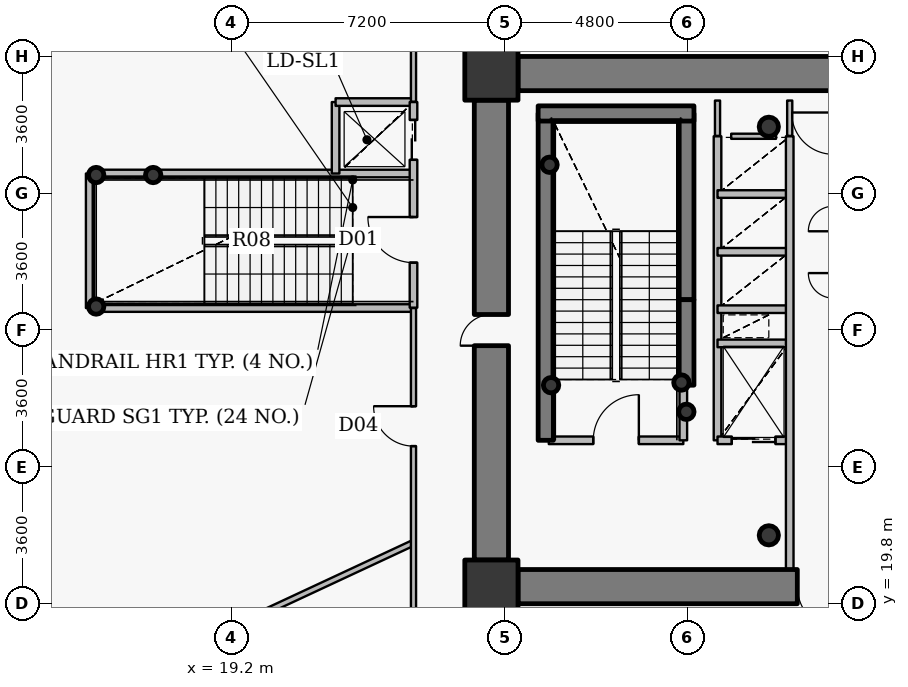
"""IFC4 building model, lengths in metres.
Left out: names, types, materials, properties, quantities, classifications, styles, units other than length and angle.
Written with IfcOpenShell. Run it as: python <this file> out.ifc"""

import sys

from ifc_helpers import new_model, si_unit, direction, frame, frame_2d, origin, origin_2d, place, context, subcontext, project, spatial, rectangle, hollow_circle, extrude, source, transform, mapped, element, fill, save


model = new_model("IFC4")
c1 = context("Model", 3, precision=1e-05, world=origin(), true_north=direction((0.0, 1.0)))
c2 = subcontext(c1, "Body", "Model", "MODEL_VIEW")
j1 = project(units=[si_unit("LENGTHUNIT", "METRE"), si_unit("PLANEANGLEUNIT", "RADIAN")], contexts=[c1])
p1 = place(None, origin())
s1 = spatial("IfcSite", under=j1, at=p1, CompositionType="ELEMENT")
p2 = place(p1, origin())
s2 = spatial("IfcBuilding", under=s1, at=p2, CompositionType="ELEMENT")
p3 = place(p2, frame((0.0, 0.0, 22.8)))
s3 = spatial("IfcBuildingStorey", under=s2, at=p3, CompositionType="ELEMENT", Elevation=22.8)
for number, where, z_axis, x_axis in (
    (1, (26.05, 20.25, 0.0), (0.0, 0.0, 1.0), (1.0, 0.0, 0.0)),
    (2, (26.05, 33.75, 0.0), (0.0, 0.0, 1.0), (1.0, 0.0, 0.0)),
):
    element("IfcColumn", number, at=place(p3, frame(where, z_axis=z_axis, x_axis=x_axis)), inside=s3, PredefinedType="COLUMN", context=c2, shape_type="SweptSolid", body=[
        extrude(rectangle(XDim=1.4, YDim=1.4, at=origin_2d()), origin(), (0.0, 0.0, 1.0), 4.2),
    ])
for number, where, z_axis, x_axis in (
    (3, (33.35, 21.6, 0.0), (0.0, 0.0, 1.0), (1.0, 0.0, 0.0)),
    (4, (33.35, 32.35, 0.0), (0.0, 0.0, 1.0), (1.0, 0.0, 0.0)),
):
    element("IfcColumn", number, at=place(p3, frame(where, z_axis=z_axis, x_axis=x_axis)), inside=s3, PredefinedType="COLUMN", context=c2, shape_type="SweptSolid", body=[
        extrude(hollow_circle(Radius=0.254, WallThickness=0.02, at=origin_2d()), origin(), (0.0, 0.0, 1.0), 4.2),
    ])
p4 = place(p3, frame((27.48, 24.1, 0.0), z_axis=(0.0, 0.0, 1.0), x_axis=(0.0, 1.0, 0.0)))
e5 = element("IfcWall", 5, at=p4, inside=s3, PredefinedType="SHEAR", context=c2, shape_type="SweptSolid", body=[
    extrude(rectangle(XDim=8.6, YDim=0.4, at=frame_2d((4.3, 0.0))), origin(), (0.0, 0.0, 1.0), 4.2),
])
p5 = place(p3, frame((31.18, 27.8, 0.0), z_axis=(0.0, 0.0, 1.0), x_axis=(0.0, 1.0, 0.0)))
e6 = element("IfcWall", 6, at=p5, inside=s3, PredefinedType="SHEAR", context=c2, shape_type="SweptSolid", body=[
    extrude(rectangle(XDim=4.9, YDim=0.4, at=frame_2d((2.45, 0.0))), origin(), (0.0, 0.0, 1.0), 4.2),
])
p6 = place(p3, frame((27.28, 32.7, 0.0), z_axis=(0.0, 0.0, 1.0), x_axis=(1.0, 0.0, 0.0)))
e7 = element("IfcWall", 7, at=p6, inside=s3, PredefinedType="SHEAR", context=c2, shape_type="SweptSolid", body=[
    extrude(rectangle(XDim=4.1, YDim=0.4, at=frame_2d((2.05, 0.0))), origin(), (0.0, 0.0, 1.0), 4.2),
])
for number, where, z_axis, x_axis in (
    (8, (27.58, 31.35, 0.0), (0.0, 0.0, 1.0), (1.0, 0.0, 0.0)),
    (9, (31.05, 25.62, 0.0), (0.0, 0.0, 1.0), (1.0, 0.0, 0.0)),
    (10, (31.18, 24.85, 0.0), (0.0, 0.0, 1.0), (1.0, 0.0, 0.0)),
    (11, (27.62, 25.55, 0.0), (0.0, 0.0, 1.0), (1.0, 0.0, 0.0)),
    (12, (15.65, 27.62, 0.0), (0.0, 0.0, 1.0), (1.0, 0.0, 0.0)),
    (13, (15.65, 31.08, 0.0), (0.0, 0.0, 1.0), (1.0, 0.0, 0.0)),
    (14, (17.15, 31.08, 0.0), (0.0, 0.0, 1.0), (1.0, 0.0, 0.0)),
):
    element("IfcColumn", number, at=place(p3, frame(where, z_axis=z_axis, x_axis=x_axis)), inside=s3, PredefinedType="COLUMN", context=c2, shape_type="SweptSolid", body=[
        extrude(hollow_circle(Radius=0.203, WallThickness=0.016, at=origin_2d()), origin(), (0.0, 0.0, 1.0), 4.2),
    ])
p7 = place(p3, frame((26.75, 33.75, 0.0), z_axis=(0.0, 0.0, 1.0), x_axis=(1.0, 0.0, 0.0)))
e15 = element("IfcWall", 15, at=p7, inside=s3, PredefinedType="SHEAR", context=c2, shape_type="SweptSolid", body=[
    extrude(rectangle(XDim=18.5, YDim=0.9, at=frame_2d((9.25, 0.0))), origin(), (0.0, 0.0, 1.0), 3.35),
])
p8 = place(p3, frame((45.25, 20.25, 0.0), z_axis=(0.0, 0.0, 1.0), x_axis=(-1.0, 0.0, 0.0)))
e16 = element("IfcWall", 16, at=p8, inside=s3, PredefinedType="SHEAR", context=c2, shape_type="SweptSolid", body=[
    extrude(rectangle(XDim=18.5, YDim=0.9, at=frame_2d((9.25, 0.0))), origin(), (0.0, 0.0, 1.0), 3.35),
])
p9 = place(p8, frame((10.0, 0.0, 0.0)))
e17 = element("IfcOpeningElement", 17, at=p9, cuts=e16, PredefinedType="OPENING", context=c2, shape_type="SweptSolid", body=[
    extrude(rectangle(XDim=1.15, YDim=2.15, at=origin_2d()), frame((0.575, 0.46, 1.075), z_axis=(0.0, -1.0, 0.0), x_axis=(1.0, 0.0, 0.0)), (0.0, 0.0, 1.0), 0.92),
])
p10 = place(p3, frame((26.05, 20.95, 0.0), z_axis=(0.0, 0.0, 1.0), x_axis=(0.0, 1.0, 0.0)))
e18 = element("IfcWall", 18, at=p10, inside=s3, PredefinedType="SHEAR", context=c2, shape_type="SweptSolid", body=[
    extrude(rectangle(XDim=12.1, YDim=0.9, at=frame_2d((6.05, 0.0))), origin(), (0.0, 0.0, 1.0), 3.35),
])
p11 = place(p10, frame((5.64, 0.0, 0.0)))
e19 = element("IfcOpeningElement", 19, at=p11, cuts=e18, PredefinedType="OPENING", context=c2, shape_type="SweptSolid", body=[
    extrude(rectangle(XDim=0.82, YDim=2.1, at=origin_2d()), frame((0.41, 0.46, 1.05), z_axis=(0.0, -1.0, 0.0), x_axis=(1.0, 0.0, 0.0)), (0.0, 0.0, 1.0), 0.92),
])
p12 = place(p3, frame((31.18, 25.55, 0.0), z_axis=(0.0, 0.0, 1.0), x_axis=(0.0, 1.0, 0.0)))
e20 = element("IfcWall", 20, at=p12, inside=s3, PredefinedType="SHEAR", context=c2, shape_type="SweptSolid", body=[
    extrude(rectangle(XDim=2.25, YDim=0.4, at=frame_2d((1.125, 0.0))), origin(), (0.0, 0.0, 1.0), 3.5),
])
p13 = place(p3, frame((7.671, 13.79, 0.0), z_axis=(0.0, 0.0, 1.0), x_axis=(0.906305303078, 0.422623588567, 0.0)))
e21 = element("IfcWall", 21, at=p13, inside=s3, PredefinedType="PARTITIONING", context=c2, shape_type="SweptSolid", body=[
    extrude(rectangle(XDim=18.017, YDim=0.15, at=frame_2d((9.009, 0.0))), origin(), (0.0, 0.0, 1.0), 3.085),
])
p14 = place(p3, frame((15.48, 27.58, 0.0), z_axis=(0.0, 0.0, 1.0), x_axis=(0.0, 1.0, 0.0)))
e22 = element("IfcWall", 22, at=p14, inside=s3, PredefinedType="PARTITIONING", context=c2, shape_type="SweptSolid", body=[
    extrude(rectangle(XDim=3.54, YDim=0.2, at=frame_2d((1.77, 0.0))), origin(), (0.0, 0.0, 1.0), 3.9),
])
for number, where, z_axis, x_axis in (
    (23, (15.48, 27.58, 0.0), (0.0, 0.0, 1.0), (1.0, 0.0, 0.0)),
    (24, (15.48, 31.12, 0.0), (0.0, 0.0, 1.0), (1.0, 0.0, 0.0)),
):
    element("IfcWall", number, at=place(p3, frame(where, z_axis=z_axis, x_axis=x_axis)), inside=s3, PredefinedType="PARTITIONING", context=c2, shape_type="SweptSolid", body=[
        extrude(rectangle(XDim=8.52, YDim=0.2, at=frame_2d((4.26, 0.0))), origin(), (0.0, 0.0, 1.0), 3.9),
    ])
p15 = place(p3, frame((21.95, 31.12, 0.0), z_axis=(0.0, 0.0, 1.0), x_axis=(0.0, 1.0, 0.0)))
e25 = element("IfcWall", 25, at=p15, inside=s3, PredefinedType="PARTITIONING", context=c2, shape_type="SweptSolid", body=[
    extrude(rectangle(XDim=1.88, YDim=0.2, at=frame_2d((0.94, 0.0))), origin(), (0.0, 0.0, 1.0), 2.685),
])
p16 = place(p3, frame((21.95, 33.0, 0.0), z_axis=(0.0, 0.0, 1.0), x_axis=(1.0, 0.0, 0.0)))
e26 = element("IfcWall", 26, at=p16, inside=s3, PredefinedType="PARTITIONING", context=c2, shape_type="SweptSolid", body=[
    extrude(rectangle(XDim=2.05, YDim=0.2, at=frame_2d((1.025, 0.0))), origin(), (0.0, 0.0, 1.0), 3.9),
])
p17 = place(p3, frame((24.0, 14.8, 0.0), z_axis=(0.0, 0.0, 1.0), x_axis=(0.0, 1.0, 0.0)))
e27 = element("IfcWall", 27, at=p17, inside=s3, PredefinedType="PARTITIONING", context=c2, shape_type="SweptSolid", body=[
    extrude(rectangle(XDim=12.78, YDim=0.135, at=frame_2d((6.39, 0.0))), origin(), (0.0, 0.0, 1.0), 2.685),
])
p18 = place(p17, frame((9.147, 0.0, 0.0)))
e28 = element("IfcOpeningElement", 28, at=p18, cuts=e27, PredefinedType="OPENING", context=c2, shape_type="SweptSolid", body=[
    extrude(rectangle(XDim=1.05, YDim=2.15, at=origin_2d()), frame((0.525, 0.078, 1.075), z_axis=(0.0, -1.0, 0.0), x_axis=(1.0, 0.0, 0.0)), (0.0, 0.0, 1.0), 0.155),
])
p19 = place(p3, frame((24.0, 27.59, 0.0), z_axis=(0.0, 0.0, 1.0), x_axis=(0.0, 1.0, 0.0)))
e29 = element("IfcWall", 29, at=p19, inside=s3, PredefinedType="PARTITIONING", context=c2, shape_type="SweptSolid", body=[
    extrude(rectangle(XDim=5.41, YDim=0.2, at=frame_2d((2.705, 0.0))), origin(), (0.0, 0.0, 1.0), 2.685),
])
p20 = place(p19, frame((1.185, 0.0, 0.0)))
e30 = element("IfcOpeningElement", 30, at=p20, cuts=e29, PredefinedType="OPENING", context=c2, shape_type="SweptSolid", body=[
    extrude(rectangle(XDim=1.2, YDim=2.15, at=origin_2d()), frame((0.6, 0.11, 1.075), z_axis=(0.0, -1.0, 0.0), x_axis=(1.0, 0.0, 0.0)), (0.0, 0.0, 1.0), 0.22),
])
p21 = place(p19, frame((3.89, 0.0, 0.0)))
e31 = element("IfcOpeningElement", 31, at=p21, cuts=e29, PredefinedType="OPENING", context=c2, shape_type="SweptSolid", body=[
    extrude(rectangle(XDim=1.05, YDim=2.15, at=origin_2d()), frame((0.525, 0.11, 1.075), z_axis=(0.0, -1.0, 0.0), x_axis=(1.0, 0.0, 0.0)), (0.0, 0.0, 1.0), 0.22),
])
p22 = place(p3, frame((24.0, 33.01, 0.0), z_axis=(0.0, 0.0, 1.0), x_axis=(0.0, 1.0, 0.0)))
e32 = element("IfcWall", 32, at=p22, inside=s3, PredefinedType="PARTITIONING", context=c2, shape_type="SweptSolid", body=[
    extrude(rectangle(XDim=8.19, YDim=0.135, at=frame_2d((4.095, 0.0))), origin(), (0.0, 0.0, 1.0), 2.685),
])
p23 = place(p3, frame((27.56, 24.1, 0.0), z_axis=(0.0, 0.0, 1.0), x_axis=(1.0, 0.0, 0.0)))
e33 = element("IfcWall", 33, at=p23, inside=s3, PredefinedType="PARTITIONING", context=c2, shape_type="SweptSolid", body=[
    extrude(rectangle(XDim=3.54, YDim=0.2, at=frame_2d((1.77, 0.0))), origin(), (0.0, 0.0, 1.0), 3.9),
])
p24 = place(p23, frame((1.17, 0.0, 0.0)))
e34 = element("IfcOpeningElement", 34, at=p24, cuts=e33, PredefinedType="OPENING", context=c2, shape_type="SweptSolid", body=[
    extrude(rectangle(XDim=1.2, YDim=2.15, at=origin_2d()), frame((0.6, 0.11, 1.075), z_axis=(0.0, -1.0, 0.0), x_axis=(1.0, 0.0, 0.0)), (0.0, 0.0, 1.0), 0.22),
])
p25 = place(p3, frame((31.1, 24.1, 0.0), z_axis=(0.0, 0.0, 1.0), x_axis=(0.0, 1.0, 0.0)))
e35 = element("IfcWall", 35, at=p25, inside=s3, PredefinedType="PARTITIONING", context=c2, shape_type="SweptSolid", body=[
    extrude(rectangle(XDim=1.44, YDim=0.2, at=frame_2d((0.72, 0.0))), origin(), (0.0, 0.0, 1.0), 3.9),
])
p26 = place(p3, frame((32.0, 24.1, 0.0), z_axis=(0.0, 0.0, 1.0), x_axis=(0.0, 1.0, 0.0)))
e36 = element("IfcWall", 36, at=p26, inside=s3, PredefinedType="PARTITIONING", context=c2, shape_type="SweptSolid", body=[
    extrude(rectangle(XDim=8.0, YDim=0.2, at=frame_2d((4.0, 0.0))), origin(), (0.0, 0.0, 1.0), 3.9),
])
p27 = place(p3, frame((32.0, 24.1, 0.0), z_axis=(0.0, 0.0, 1.0), x_axis=(1.0, 0.0, 0.0)))
e37 = element("IfcWall", 37, at=p27, inside=s3, PredefinedType="PARTITIONING", context=c2, shape_type="SweptSolid", body=[
    extrude(rectangle(XDim=1.9, YDim=0.2, at=frame_2d((0.95, 0.0))), origin(), (0.0, 0.0, 1.0), 3.485),
])
p28 = place(p27, frame((0.375, 0.0, 0.0)))
e38 = element("IfcOpeningElement", 38, at=p28, cuts=e37, PredefinedType="OPENING", context=c2, shape_type="SweptSolid", body=[
    extrude(rectangle(XDim=1.15, YDim=2.15, at=origin_2d()), frame((0.575, 0.11, 1.075), z_axis=(0.0, -1.0, 0.0), x_axis=(1.0, 0.0, 0.0)), (0.0, 0.0, 1.0), 0.22),
])
for number, where, z_axis, x_axis in (
    (39, (32.0, 26.65, 0.0), (0.0, 0.0, 1.0), (1.0, 0.0, 0.0)),
    (40, (32.0, 27.55, 0.0), (0.0, 0.0, 1.0), (1.0, 0.0, 0.0)),
    (41, (32.0, 29.06, 0.0), (0.0, 0.0, 1.0), (1.0, 0.0, 0.0)),
    (42, (32.0, 30.58, 0.0), (0.0, 0.0, 1.0), (1.0, 0.0, 0.0)),
):
    element("IfcWall", number, at=place(p3, frame(where, z_axis=z_axis, x_axis=x_axis)), inside=s3, PredefinedType="PARTITIONING", context=c2, shape_type="SweptSolid", body=[
        extrude(rectangle(XDim=1.9, YDim=0.2, at=frame_2d((0.95, 0.0))), origin(), (0.0, 0.0, 1.0), 3.485),
    ])
p29 = place(p3, frame((33.9, 20.7, 0.0), z_axis=(0.0, 0.0, 1.0), x_axis=(0.0, 1.0, 0.0)))
e43 = element("IfcWall", 43, at=p29, inside=s3, PredefinedType="PARTITIONING", context=c2, shape_type="SweptSolid", body=[
    extrude(rectangle(XDim=11.4, YDim=0.2, at=frame_2d((5.7, 0.0))), origin(), (0.0, 0.0, 1.0), 3.485),
])
p30 = place(p3, frame((32.36, 32.1, 0.0), z_axis=(0.0, 0.0, 1.0), x_axis=(1.0, 0.0, 0.0)))
e44 = element("IfcWall", 44, at=p30, inside=s3, PredefinedType="PARTITIONING", context=c2, shape_type="SweptSolid", body=[
    extrude(rectangle(XDim=1.18, YDim=0.135, at=frame_2d((0.59, 0.0))), origin(), (0.0, 0.0, 1.0), 3.485),
])
p31 = place(p3, frame((32.0, 33.04, 0.0), z_axis=(0.0, 0.0, 1.0), x_axis=(0.0, -1.0, 0.0)))
e45 = element("IfcWall", 45, at=p31, inside=s3, PredefinedType="PARTITIONING", context=c2, shape_type="SweptSolid", body=[
    extrude(rectangle(XDim=0.93, YDim=0.135, at=frame_2d((0.465, 0.0))), origin(), (0.0, 0.0, 1.0), 3.435),
])
p32 = place(p3, frame((33.9, 32.11, 0.0), z_axis=(0.0, 0.0, 1.0), x_axis=(0.0, 1.0, 0.0)))
e46 = element("IfcWall", 46, at=p32, inside=s3, PredefinedType="PARTITIONING", context=c2, shape_type="SweptSolid", body=[
    extrude(rectangle(XDim=0.93, YDim=0.135, at=frame_2d((0.465, 0.0))), origin(), (0.0, 0.0, 1.0), 3.485),
])
p33 = place(p3, frame((25.95, 38.893, 0.0), z_axis=(0.0, 0.0, 1.0), x_axis=(0.0, -1.0, 0.0)))
e47 = element("IfcWall", 47, at=p33, inside=s3, PredefinedType="PARTITIONING", context=c2, shape_type="SweptSolid", body=[
    extrude(rectangle(XDim=4.693, YDim=0.135, at=frame_2d((2.346, 0.0))), origin(), (0.0, 0.0, 1.0), 2.685),
])
for number, where, z_axis, x_axis in (
    (48, (25.6, 34.2, 0.0), (0.0, 0.0, 1.0), (0.0, -1.0, 0.0)),
    (49, (25.6, 20.94, 0.0), (0.0, 0.0, 1.0), (0.0, -1.0, 0.0)),
):
    element("IfcWall", number, at=place(p3, frame(where, z_axis=z_axis, x_axis=x_axis)), inside=s3, PredefinedType="PARTITIONING", context=c2, shape_type="SweptSolid", body=[
        extrude(rectangle(XDim=1.14, YDim=0.135, at=frame_2d((0.57, 0.0))), origin(), (0.0, 0.0, 1.0), 3.9),
    ])
p34 = place(p3, frame((25.907, 19.8, 0.0), z_axis=(0.0, 0.0, 1.0), x_axis=(1.0, 0.0, 0.0)))
e50 = element("IfcWall", 50, at=p34, inside=s3, PredefinedType="PARTITIONING", context=c2, shape_type="SweptSolid", body=[
    extrude(rectangle(XDim=0.833, YDim=0.135, at=frame_2d((0.416, 0.0))), origin(), (0.0, 0.0, 1.0), 2.685),
])
m1 = source(origin(), c2, "Body", "SweptSolid", [
    extrude(rectangle(XDim=0.82, YDim=2.1, at=origin_2d()), frame((0.41, 0.025, 1.05), z_axis=(0.0, -1.0, 0.0), x_axis=(1.0, 0.0, 0.0)), (0.0, 0.0, 1.0), 0.05),
])
p35 = place(p11, origin())
e51 = element("IfcDoor", 51, at=p35, inside=s3, OperationType="SINGLE_SWING_LEFT", PredefinedType="DOOR", context=c2, shape_type="MappedRepresentation", body=[
    mapped(m1, transform((0.0, 0.0, 0.0), x_axis=(1.0, 0.0, 0.0), y_axis=(0.0, 1.0, 0.0), z_axis=(0.0, 0.0, 1.0), scale=1.0)),
])
fill(e19, e51)
m2 = source(origin(), c2, "Body", "SweptSolid", [
    extrude(rectangle(XDim=1.15, YDim=2.15, at=origin_2d()), frame((0.575, 0.025, 1.075), z_axis=(0.0, -1.0, 0.0), x_axis=(1.0, 0.0, 0.0)), (0.0, 0.0, 1.0), 0.05),
])
p36 = place(p9, origin())
e52 = element("IfcDoor", 52, at=p36, inside=s3, OperationType="SINGLE_SWING_LEFT", PredefinedType="DOOR", context=c2, shape_type="MappedRepresentation", body=[
    mapped(m2, transform((0.0, 0.0, 0.0), x_axis=(1.0, 0.0, 0.0), y_axis=(0.0, 1.0, 0.0), z_axis=(0.0, 0.0, 1.0), scale=1.0)),
])
fill(e17, e52)
m3 = source(origin(), c2, "Body", "SweptSolid", [
    extrude(rectangle(XDim=1.2, YDim=2.15, at=origin_2d()), frame((0.6, 0.025, 1.075), z_axis=(0.0, -1.0, 0.0), x_axis=(1.0, 0.0, 0.0)), (0.0, 0.0, 1.0), 0.05),
])
p37 = place(p24, origin())
e53 = element("IfcDoor", 53, at=p37, inside=s3, OperationType="SINGLE_SWING_RIGHT", PredefinedType="DOOR", context=c2, shape_type="MappedRepresentation", body=[
    mapped(m3, transform((0.0, 0.0, 0.0), x_axis=(1.0, 0.0, 0.0), y_axis=(0.0, 1.0, 0.0), z_axis=(0.0, 0.0, 1.0), scale=1.0)),
])
fill(e34, e53)
p38 = place(p20, origin())
e54 = element("IfcDoor", 54, at=p38, inside=s3, OperationType="SINGLE_SWING_RIGHT", PredefinedType="DOOR", context=c2, shape_type="MappedRepresentation", body=[
    mapped(m3, transform((0.0, 0.0, 0.0), x_axis=(1.0, 0.0, 0.0), y_axis=(0.0, 1.0, 0.0), z_axis=(0.0, 0.0, 1.0), scale=1.0)),
])
fill(e30, e54)
m4 = source(origin(), c2, "Body", "SweptSolid", [
    extrude(rectangle(XDim=1.15, YDim=2.15, at=origin_2d()), frame((0.575, 0.025, 1.075), z_axis=(0.0, -1.0, 0.0), x_axis=(1.0, 0.0, 0.0)), (0.0, 0.0, 1.0), 0.05),
])
p39 = place(p28, origin())
e55 = element("IfcDoor", 55, at=p39, inside=s3, OperationType="DOUBLE_DOOR_SLIDING", PredefinedType="USERDEFINED", context=c2, shape_type="MappedRepresentation", body=[
    mapped(m4, transform((0.0, 0.0, 0.0), x_axis=(1.0, 0.0, 0.0), y_axis=(0.0, 1.0, 0.0), z_axis=(0.0, 0.0, 1.0), scale=1.0)),
])
fill(e38, e55)
m5 = source(origin(), c2, "Body", "SweptSolid", [
    extrude(rectangle(XDim=1.05, YDim=2.15, at=origin_2d()), frame((0.525, 0.025, 1.075), z_axis=(0.0, -1.0, 0.0), x_axis=(1.0, 0.0, 0.0)), (0.0, 0.0, 1.0), 0.05),
])
p40 = place(p21, origin())
e56 = element("IfcDoor", 56, at=p40, inside=s3, OperationType="DOUBLE_DOOR_SLIDING", PredefinedType="USERDEFINED", context=c2, shape_type="MappedRepresentation", body=[
    mapped(m5, transform((0.0, 0.0, 0.0), x_axis=(1.0, 0.0, 0.0), y_axis=(0.0, 1.0, 0.0), z_axis=(0.0, 0.0, 1.0), scale=1.0)),
])
fill(e31, e56)
m6 = source(origin(), c2, "Body", "SweptSolid", [
    extrude(rectangle(XDim=1.05, YDim=2.15, at=origin_2d()), frame((0.525, 0.025, 1.075), z_axis=(0.0, -1.0, 0.0), x_axis=(1.0, 0.0, 0.0)), (0.0, 0.0, 1.0), 0.05),
])
p41 = place(p18, origin())
e57 = element("IfcDoor", 57, at=p41, inside=s3, OperationType="SINGLE_SWING_RIGHT", PredefinedType="DOOR", context=c2, shape_type="MappedRepresentation", body=[
    mapped(m6, transform((0.0, 0.0, 0.0), x_axis=(1.0, 0.0, 0.0), y_axis=(0.0, 1.0, 0.0), z_axis=(0.0, 0.0, 1.0), scale=1.0)),
])
fill(e28, e57)
save(model, sys.argv[1])
